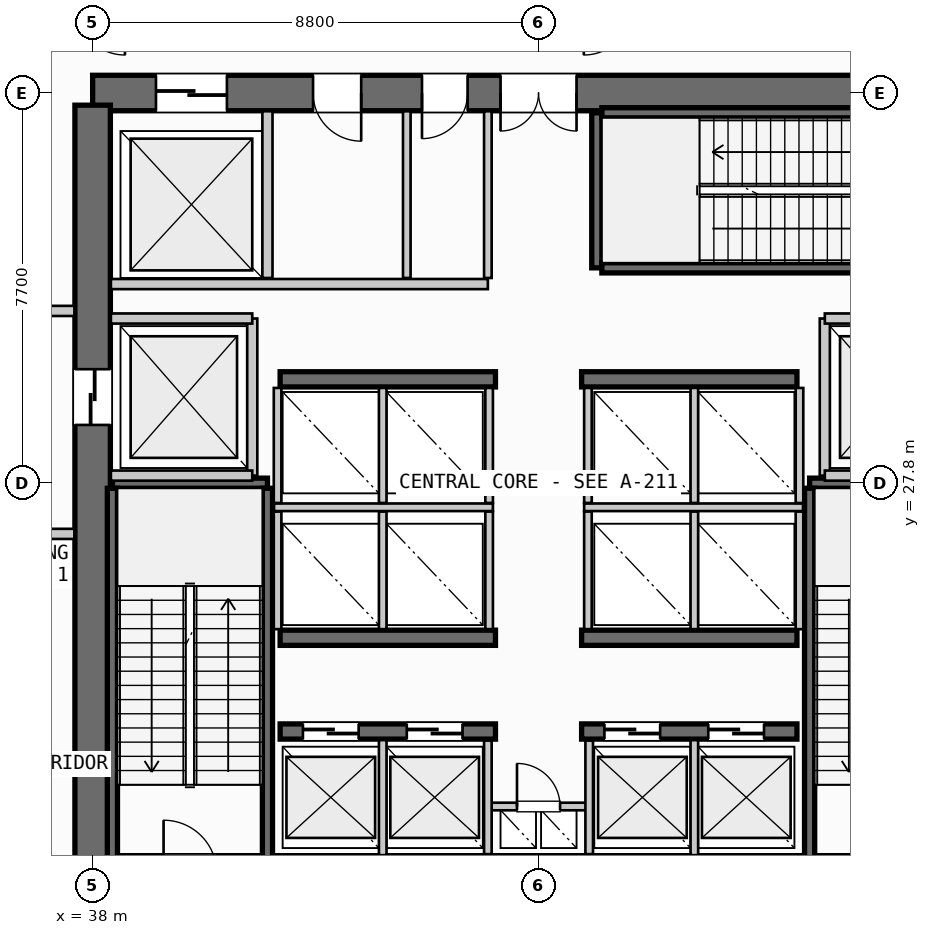
"""IFC4 building model, lengths in metres.
Left out: names, types, materials, properties, quantities, classifications, styles, units other than length and angle.
Written with IfcOpenShell. Run it as: python <this file> out.ifc"""

import sys

from ifc_helpers import new_model, si_unit, direction, frame, frame_2d, origin, place, context, subcontext, project, spatial, rectangle, extrude, source, transform, mapped, element, fill, save


model = new_model("IFC4")
c1 = context("Model", 3, precision=1e-05, world=origin(), true_north=direction((0.0, 1.0)))
c2 = subcontext(c1, "Body", "Model", "MODEL_VIEW")
j1 = project(units=[si_unit("LENGTHUNIT", "METRE"), si_unit("PLANEANGLEUNIT", "RADIAN")], contexts=[c1])
p1 = place(None, origin())
s1 = spatial("IfcSite", under=j1, at=p1, CompositionType="ELEMENT")
p2 = place(p1, origin())
s2 = spatial("IfcBuilding", under=s1, at=p2, CompositionType="ELEMENT")
p3 = place(p2, frame((0.0, 0.0, 80.4)))
s3 = spatial("IfcBuildingStorey", under=s2, at=p3, CompositionType="ELEMENT", Elevation=80.4)
p4 = place(p3, frame((38.0, 20.1, 0.0), z_axis=(0.0, 0.0, 1.0), x_axis=(1.0, 0.0, 0.0)))
e1 = element("IfcWall", 1, at=p4, inside=s3, PredefinedType="SHEAR", context=c2, shape_type="SweptSolid", body=[
    extrude(rectangle(XDim=17.6, YDim=0.7, at=frame_2d((8.8, 0.0))), origin(), (0.0, 0.0, 1.0), 4.76),
])
p5 = place(p4, frame((1.4, 0.0, 0.0)))
e2 = element("IfcOpeningElement", 2, at=p5, cuts=e1, PredefinedType="OPENING", context=c2, shape_type="SweptSolid", body=[
    extrude(rectangle(XDim=1.05, YDim=2.15, at=frame_2d((0.525, 1.075))), frame((0.0, 0.36, 0.0), z_axis=(0.0, -1.0, 0.0), x_axis=(1.0, 0.0, 0.0)), (0.0, 0.0, 1.0), 0.72),
])
p6 = place(p4, frame((15.15, 0.0, 0.0)))
e3 = element("IfcOpeningElement", 3, at=p6, cuts=e1, PredefinedType="OPENING", context=c2, shape_type="SweptSolid", body=[
    extrude(rectangle(XDim=1.05, YDim=2.15, at=frame_2d((0.525, 1.075))), frame((0.0, 0.36, 0.0), z_axis=(0.0, -1.0, 0.0), x_axis=(1.0, 0.0, 0.0)), (0.0, 0.0, 1.0), 0.72),
])
p7 = place(p3, frame((55.6, 35.5, 0.0), z_axis=(0.0, 0.0, 1.0), x_axis=(-1.0, 0.0, 0.0)))
e4 = element("IfcWall", 4, at=p7, inside=s3, PredefinedType="SHEAR", context=c2, shape_type="SweptSolid", body=[
    extrude(rectangle(XDim=17.6, YDim=0.7, at=frame_2d((8.8, 0.0))), origin(), (0.0, 0.0, 1.0), 4.76),
])
p8 = place(p7, frame((8.05, 0.0, 0.0)))
e5 = element("IfcOpeningElement", 5, at=p8, cuts=e4, PredefinedType="OPENING", context=c2, shape_type="SweptSolid", body=[
    extrude(rectangle(XDim=1.5, YDim=2.2, at=frame_2d((0.75, 1.1))), frame((0.0, 0.36, 0.0), z_axis=(0.0, -1.0, 0.0), x_axis=(1.0, 0.0, 0.0)), (0.0, 0.0, 1.0), 0.72),
])
p9 = place(p7, frame((14.95, 0.0, 0.0)))
e6 = element("IfcOpeningElement", 6, at=p9, cuts=e4, PredefinedType="OPENING", context=c2, shape_type="SweptSolid", body=[
    extrude(rectangle(XDim=1.4, YDim=2.3, at=frame_2d((0.7, 1.15))), frame((0.0, 0.36, 0.0), z_axis=(0.0, -1.0, 0.0), x_axis=(1.0, 0.0, 0.0)), (0.0, 0.0, 1.0), 0.72),
])
p10 = place(p7, frame((12.3, 0.0, 0.0)))
e7 = element("IfcOpeningElement", 7, at=p10, cuts=e4, PredefinedType="OPENING", context=c2, shape_type="SweptSolid", body=[
    extrude(rectangle(XDim=0.95, YDim=2.15, at=frame_2d((0.475, 1.075))), frame((0.0, 0.36, 0.0), z_axis=(0.0, -1.0, 0.0), x_axis=(1.0, 0.0, 0.0)), (0.0, 0.0, 1.0), 0.72),
])
p11 = place(p7, frame((10.2, 0.0, 0.0)))
e8 = element("IfcOpeningElement", 8, at=p11, cuts=e4, PredefinedType="OPENING", context=c2, shape_type="SweptSolid", body=[
    extrude(rectangle(XDim=0.9, YDim=2.15, at=frame_2d((0.45, 1.075))), frame((0.0, 0.36, 0.0), z_axis=(0.0, -1.0, 0.0), x_axis=(1.0, 0.0, 0.0)), (0.0, 0.0, 1.0), 0.72),
])
p12 = place(p3, frame((38.0, 35.26, 0.0), z_axis=(0.0, 0.0, 1.0), x_axis=(0.0, -1.0, 0.0)))
e9 = element("IfcWall", 9, at=p12, inside=s3, PredefinedType="SHEAR", context=c2, shape_type="SweptSolid", body=[
    extrude(rectangle(XDim=14.92, YDim=0.7, at=frame_2d((7.46, 0.0))), origin(), (0.0, 0.0, 1.0), 4.76),
])
p13 = place(p12, frame((5.21, 0.0, 0.0)))
e10 = element("IfcOpeningElement", 10, at=p13, cuts=e9, PredefinedType="OPENING", context=c2, shape_type="SweptSolid", body=[
    extrude(rectangle(XDim=1.1, YDim=2.2, at=frame_2d((0.55, 1.1))), frame((0.0, 0.36, 0.0), z_axis=(0.0, -1.0, 0.0), x_axis=(1.0, 0.0, 0.0)), (0.0, 0.0, 1.0), 0.72),
])
p14 = place(p3, frame((41.7, 22.9, 0.0), z_axis=(0.0, 0.0, 1.0), x_axis=(1.0, 0.0, 0.0)))
e11 = element("IfcWall", 11, at=p14, inside=s3, PredefinedType="SHEAR", context=c2, shape_type="SweptSolid", body=[
    extrude(rectangle(XDim=4.25, YDim=0.3, at=frame_2d((2.125, 0.0))), origin(), (0.0, 0.0, 1.0), 4.76),
])
p15 = place(p14, frame((0.45, 0.0, 0.0)))
e12 = element("IfcOpeningElement", 12, at=p15, cuts=e11, PredefinedType="OPENING", context=c2, shape_type="SweptSolid", body=[
    extrude(rectangle(XDim=1.1, YDim=2.2, at=frame_2d((0.55, 1.1))), frame((0.0, 0.16, 0.0), z_axis=(0.0, -1.0, 0.0), x_axis=(1.0, 0.0, 0.0)), (0.0, 0.0, 1.0), 0.32),
])
p16 = place(p14, frame((2.5, 0.0, 0.0)))
e13 = element("IfcOpeningElement", 13, at=p16, cuts=e11, PredefinedType="OPENING", context=c2, shape_type="SweptSolid", body=[
    extrude(rectangle(XDim=1.1, YDim=2.2, at=frame_2d((0.55, 1.1))), frame((0.0, 0.16, 0.0), z_axis=(0.0, -1.0, 0.0), x_axis=(1.0, 0.0, 0.0)), (0.0, 0.0, 1.0), 0.32),
])
p17 = place(p3, frame((47.65, 22.9, 0.0), z_axis=(0.0, 0.0, 1.0), x_axis=(1.0, 0.0, 0.0)))
e14 = element("IfcWall", 14, at=p17, inside=s3, PredefinedType="SHEAR", context=c2, shape_type="SweptSolid", body=[
    extrude(rectangle(XDim=4.25, YDim=0.3, at=frame_2d((2.125, 0.0))), origin(), (0.0, 0.0, 1.0), 4.76),
])
p18 = place(p17, frame((0.45, 0.0, 0.0)))
e15 = element("IfcOpeningElement", 15, at=p18, cuts=e14, PredefinedType="OPENING", context=c2, shape_type="SweptSolid", body=[
    extrude(rectangle(XDim=1.1, YDim=2.2, at=frame_2d((0.55, 1.1))), frame((0.0, 0.16, 0.0), z_axis=(0.0, -1.0, 0.0), x_axis=(1.0, 0.0, 0.0)), (0.0, 0.0, 1.0), 0.32),
])
p19 = place(p17, frame((2.5, 0.0, 0.0)))
e16 = element("IfcOpeningElement", 16, at=p19, cuts=e14, PredefinedType="OPENING", context=c2, shape_type="SweptSolid", body=[
    extrude(rectangle(XDim=1.1, YDim=2.2, at=frame_2d((0.55, 1.1))), frame((0.0, 0.16, 0.0), z_axis=(0.0, -1.0, 0.0), x_axis=(1.0, 0.0, 0.0)), (0.0, 0.0, 1.0), 0.32),
])
for number, where, z_axis, x_axis in (
    (17, (41.7, 24.75, 0.0), (0.0, 0.0, 1.0), (1.0, 0.0, 0.0)),
    (18, (47.65, 24.75, 0.0), (0.0, 0.0, 1.0), (1.0, 0.0, 0.0)),
    (19, (41.7, 29.85, 0.0), (0.0, 0.0, 1.0), (1.0, 0.0, 0.0)),
    (20, (47.65, 29.85, 0.0), (0.0, 0.0, 1.0), (1.0, 0.0, 0.0)),
):
    element("IfcWall", number, at=place(p3, frame(where, z_axis=z_axis, x_axis=x_axis)), inside=s3, PredefinedType="SHEAR", context=c2, shape_type="SweptSolid", body=[
        extrude(rectangle(XDim=4.25, YDim=0.3, at=frame_2d((2.125, 0.0))), origin(), (0.0, 0.0, 1.0), 4.76),
    ])
p20 = place(p3, frame((38.39, 27.8, 0.0), z_axis=(0.0, 0.0, 1.0), x_axis=(1.0, 0.0, 0.0)))
e21 = element("IfcWall", 21, at=p20, inside=s3, PredefinedType="SHEAR", context=c2, shape_type="SweptSolid", body=[
    extrude(rectangle(XDim=3.06, YDim=0.2, at=frame_2d((1.53, 0.0))), origin(), (0.0, 0.0, 1.0), 4.76),
])
for number, where, z_axis, x_axis in (
    (22, (41.45, 27.7, 0.0), (0.0, 0.0, 1.0), (0.0, -1.0, 0.0)),
    (23, (38.39, 20.35, 0.0), (0.0, 0.0, 1.0), (0.0, 1.0, 0.0)),
):
    element("IfcWall", number, at=place(p3, frame(where, z_axis=z_axis, x_axis=x_axis)), inside=s3, PredefinedType="SHEAR", context=c2, shape_type="SweptSolid", body=[
        extrude(rectangle(XDim=7.35, YDim=0.2, at=frame_2d((3.675, 0.0))), origin(), (0.0, 0.0, 1.0), 4.76),
    ])
p21 = place(p3, frame((52.15, 27.8, 0.0), z_axis=(0.0, 0.0, 1.0), x_axis=(1.0, 0.0, 0.0)))
e24 = element("IfcWall", 24, at=p21, inside=s3, PredefinedType="SHEAR", context=c2, shape_type="SweptSolid", body=[
    extrude(rectangle(XDim=3.06, YDim=0.2, at=frame_2d((1.53, 0.0))), origin(), (0.0, 0.0, 1.0), 4.76),
])
p22 = place(p3, frame((52.15, 20.35, 0.0), z_axis=(0.0, 0.0, 1.0), x_axis=(0.0, 1.0, 0.0)))
e25 = element("IfcWall", 25, at=p22, inside=s3, PredefinedType="SHEAR", context=c2, shape_type="SweptSolid", body=[
    extrude(rectangle(XDim=7.35, YDim=0.2, at=frame_2d((3.675, 0.0))), origin(), (0.0, 0.0, 1.0), 4.76),
])
p23 = place(p3, frame((47.95, 32.05, 0.0), z_axis=(0.0, 0.0, 1.0), x_axis=(0.0, 1.0, 0.0)))
e26 = element("IfcWall", 26, at=p23, inside=s3, PredefinedType="SHEAR", context=c2, shape_type="SweptSolid", body=[
    extrude(rectangle(XDim=3.06, YDim=0.2, at=frame_2d((1.53, 0.0))), origin(), (0.0, 0.0, 1.0), 4.76),
])
for number, where, z_axis, x_axis in (
    (27, (48.05, 35.11, 0.0), (0.0, 0.0, 1.0), (1.0, 0.0, 0.0)),
    (28, (55.4, 32.05, 0.0), (0.0, 0.0, 1.0), (-1.0, 0.0, 0.0)),
):
    element("IfcWall", number, at=place(p3, frame(where, z_axis=z_axis, x_axis=x_axis)), inside=s3, PredefinedType="SHEAR", context=c2, shape_type="SweptSolid", body=[
        extrude(rectangle(XDim=7.35, YDim=0.2, at=frame_2d((3.675, 0.0))), origin(), (0.0, 0.0, 1.0), 4.76),
    ])
p24 = place(p3, frame((45.8, 21.42, 0.0), z_axis=(0.0, 0.0, 1.0), x_axis=(1.0, 0.0, 0.0)))
e29 = element("IfcWall", 29, at=p24, inside=s3, PredefinedType="PARTITIONING", context=c2, shape_type="SweptSolid", body=[
    extrude(rectangle(XDim=2.0, YDim=0.15, at=frame_2d((1.0, 0.0))), origin(), (0.0, 0.0, 1.0), 2.335),
])
p25 = place(p24, frame((0.575, 0.0, 0.0)))
e30 = element("IfcOpeningElement", 30, at=p25, cuts=e29, PredefinedType="OPENING", context=c2, shape_type="SweptSolid", body=[
    extrude(rectangle(XDim=0.85, YDim=2.15, at=frame_2d((0.425, 1.075))), frame((0.0, 0.085, 0.0), z_axis=(0.0, -1.0, 0.0), x_axis=(1.0, 0.0, 0.0)), (0.0, 0.0, 1.0), 0.17),
])
for number, where, z_axis, x_axis in (
    (31, (45.8, 20.48, 0.0), (0.0, 0.0, 1.0), (0.0, 1.0, 0.0)),
    (32, (47.8, 20.48, 0.0), (0.0, 0.0, 1.0), (0.0, 1.0, 0.0)),
):
    element("IfcWall", number, at=place(p3, frame(where, z_axis=z_axis, x_axis=x_axis)), inside=s3, PredefinedType="PARTITIONING", context=c2, shape_type="SweptSolid", body=[
        extrude(rectangle(XDim=2.24, YDim=0.15, at=frame_2d((1.12, 0.0))), origin(), (0.0, 0.0, 1.0), 2.335),
    ])
p26 = place(p3, frame((41.15, 27.95, 0.0), z_axis=(0.0, 0.0, 1.0), x_axis=(0.0, 1.0, 0.0)))
e33 = element("IfcWall", 33, at=p26, inside=s3, PredefinedType="PARTITIONING", context=c2, shape_type="SweptSolid", body=[
    extrude(rectangle(XDim=3.1, YDim=0.2, at=frame_2d((1.55, 0.0))), origin(), (0.0, 0.0, 1.0), 2.335),
])
for number, where, z_axis, x_axis in (
    (34, (38.36, 27.95, 0.0), (0.0, 0.0, 1.0), (1.0, 0.0, 0.0)),
    (35, (38.36, 31.05, 0.0), (0.0, 0.0, 1.0), (1.0, 0.0, 0.0)),
):
    element("IfcWall", number, at=place(p3, frame(where, z_axis=z_axis, x_axis=x_axis)), inside=s3, PredefinedType="PARTITIONING", context=c2, shape_type="SweptSolid", body=[
        extrude(rectangle(XDim=2.79, YDim=0.2, at=frame_2d((1.395, 0.0))), origin(), (0.0, 0.0, 1.0), 2.335),
    ])
for number, where, z_axis, x_axis in (
    (36, (34.5, 26.8, 0.0), (0.0, 0.0, 1.0), (1.0, 0.0, 0.0)),
    (37, (34.5, 31.2, 0.0), (0.0, 0.0, 1.0), (1.0, 0.0, 0.0)),
):
    element("IfcWall", number, at=place(p3, frame(where, z_axis=z_axis, x_axis=x_axis)), inside=s3, PredefinedType="PARTITIONING", context=c2, shape_type="SweptSolid", body=[
        extrude(rectangle(XDim=3.14, YDim=0.2, at=frame_2d((1.57, 0.0))), origin(), (0.0, 0.0, 1.0), 2.335),
    ])
p27 = place(p3, frame((52.45, 27.95, 0.0), z_axis=(0.0, 0.0, 1.0), x_axis=(0.0, 1.0, 0.0)))
e38 = element("IfcWall", 38, at=p27, inside=s3, PredefinedType="PARTITIONING", context=c2, shape_type="SweptSolid", body=[
    extrude(rectangle(XDim=3.1, YDim=0.2, at=frame_2d((1.55, 0.0))), origin(), (0.0, 0.0, 1.0), 2.335),
])
for number, where, z_axis, x_axis in (
    (39, (52.45, 27.95, 0.0), (0.0, 0.0, 1.0), (1.0, 0.0, 0.0)),
    (40, (52.45, 31.05, 0.0), (0.0, 0.0, 1.0), (1.0, 0.0, 0.0)),
):
    element("IfcWall", number, at=place(p3, frame(where, z_axis=z_axis, x_axis=x_axis)), inside=s3, PredefinedType="PARTITIONING", context=c2, shape_type="SweptSolid", body=[
        extrude(rectangle(XDim=2.79, YDim=0.2, at=frame_2d((1.395, 0.0))), origin(), (0.0, 0.0, 1.0), 2.335),
    ])
for number, where, z_axis, x_axis in (
    (41, (43.725, 20.46, 0.0), (0.0, 0.0, 1.0), (0.0, 1.0, 0.0)),
    (42, (49.875, 20.46, 0.0), (0.0, 0.0, 1.0), (0.0, 1.0, 0.0)),
):
    element("IfcWall", number, at=place(p3, frame(where, z_axis=z_axis, x_axis=x_axis)), inside=s3, PredefinedType="PARTITIONING", context=c2, shape_type="SweptSolid", body=[
        extrude(rectangle(XDim=2.27, YDim=0.15, at=frame_2d((1.135, 0.0))), origin(), (0.0, 0.0, 1.0), 2.335),
    ])
p28 = place(p3, frame((41.58, 27.325, 0.0), z_axis=(0.0, 0.0, 1.0), x_axis=(1.0, 0.0, 0.0)))
e43 = element("IfcWall", 43, at=p28, inside=s3, PredefinedType="PARTITIONING", context=c2, shape_type="SweptSolid", body=[
    extrude(rectangle(XDim=4.32, YDim=0.15, at=frame_2d((2.16, 0.0))), origin(), (0.0, 0.0, 1.0), 2.335),
])
p29 = place(p3, frame((47.7, 27.325, 0.0), z_axis=(0.0, 0.0, 1.0), x_axis=(1.0, 0.0, 0.0)))
e44 = element("IfcWall", 44, at=p29, inside=s3, PredefinedType="PARTITIONING", context=c2, shape_type="SweptSolid", body=[
    extrude(rectangle(XDim=4.32, YDim=0.15, at=frame_2d((2.16, 0.0))), origin(), (0.0, 0.0, 1.0), 2.335),
])
for number, where, z_axis, x_axis in (
    (45, (41.65, 24.92, 0.0), (0.0, 0.0, 1.0), (0.0, 1.0, 0.0)),
    (46, (43.725, 24.92, 0.0), (0.0, 0.0, 1.0), (0.0, 1.0, 0.0)),
    (47, (45.825, 24.92, 0.0), (0.0, 0.0, 1.0), (0.0, 1.0, 0.0)),
    (48, (47.775, 24.92, 0.0), (0.0, 0.0, 1.0), (0.0, 1.0, 0.0)),
    (49, (49.875, 24.92, 0.0), (0.0, 0.0, 1.0), (0.0, 1.0, 0.0)),
    (50, (51.95, 24.92, 0.0), (0.0, 0.0, 1.0), (0.0, 1.0, 0.0)),
):
    element("IfcWall", number, at=place(p3, frame(where, z_axis=z_axis, x_axis=x_axis)), inside=s3, PredefinedType="PARTITIONING", context=c2, shape_type="SweptSolid", body=[
        extrude(rectangle(XDim=2.32, YDim=0.15, at=frame_2d((1.16, 0.0))), origin(), (0.0, 0.0, 1.0), 2.335),
    ])
for number, where, z_axis, x_axis in (
    (51, (41.65, 27.41, 0.0), (0.0, 0.0, 1.0), (0.0, 1.0, 0.0)),
    (52, (43.725, 27.41, 0.0), (0.0, 0.0, 1.0), (0.0, 1.0, 0.0)),
    (53, (45.825, 27.41, 0.0), (0.0, 0.0, 1.0), (0.0, 1.0, 0.0)),
    (54, (47.775, 27.41, 0.0), (0.0, 0.0, 1.0), (0.0, 1.0, 0.0)),
    (55, (49.875, 27.41, 0.0), (0.0, 0.0, 1.0), (0.0, 1.0, 0.0)),
    (56, (51.95, 27.41, 0.0), (0.0, 0.0, 1.0), (0.0, 1.0, 0.0)),
):
    element("IfcWall", number, at=place(p3, frame(where, z_axis=z_axis, x_axis=x_axis)), inside=s3, PredefinedType="PARTITIONING", context=c2, shape_type="SweptSolid", body=[
        extrude(rectangle(XDim=2.27, YDim=0.15, at=frame_2d((1.135, 0.0))), origin(), (0.0, 0.0, 1.0), 2.335),
    ])
p30 = place(p3, frame((41.45, 31.85, 0.0), z_axis=(0.0, 0.0, 1.0), x_axis=(0.0, 1.0, 0.0)))
e57 = element("IfcWall", 57, at=p30, inside=s3, PredefinedType="PARTITIONING", context=c2, shape_type="SweptSolid", body=[
    extrude(rectangle(XDim=3.29, YDim=0.2, at=frame_2d((1.645, 0.0))), origin(), (0.0, 0.0, 1.0), 2.335),
])
p31 = place(p3, frame((38.36, 31.73, 0.0), z_axis=(0.0, 0.0, 1.0), x_axis=(1.0, 0.0, 0.0)))
e58 = element("IfcWall", 58, at=p31, inside=s3, PredefinedType="PARTITIONING", context=c2, shape_type="SweptSolid", body=[
    extrude(rectangle(XDim=7.44, YDim=0.2, at=frame_2d((3.72, 0.0))), origin(), (0.0, 0.0, 1.0), 2.335),
])
p32 = place(p3, frame((45.8, 31.85, 0.0), z_axis=(0.0, 0.0, 1.0), x_axis=(0.0, 1.0, 0.0)))
e59 = element("IfcWall", 59, at=p32, inside=s3, PredefinedType="PARTITIONING", context=c2, shape_type="SweptSolid", body=[
    extrude(rectangle(XDim=3.29, YDim=0.15, at=frame_2d((1.645, 0.0))), origin(), (0.0, 0.0, 1.0), 2.335),
])
p33 = place(p3, frame((44.2, 31.85, 0.0), z_axis=(0.0, 0.0, 1.0), x_axis=(0.0, 1.0, 0.0)))
e60 = element("IfcWall", 60, at=p33, inside=s3, PredefinedType="PLUMBINGWALL", context=c2, shape_type="SweptSolid", body=[
    extrude(rectangle(XDim=3.29, YDim=0.15, at=frame_2d((1.645, 0.0))), origin(), (0.0, 0.0, 1.0), 2.335),
])
m1 = source(origin(), c2, "Body", "SweptSolid", [
    extrude(rectangle(XDim=1.5, YDim=2.2, at=frame_2d((0.75, 1.1))), frame((0.0, 0.025, 0.0), z_axis=(0.0, -1.0, 0.0), x_axis=(1.0, 0.0, 0.0)), (0.0, 0.0, 1.0), 0.05),
])
p34 = place(p8, origin())
e61 = element("IfcDoor", 61, at=p34, inside=s3, OperationType="DOUBLE_DOOR_SINGLE_SWING", PredefinedType="DOOR", context=c2, shape_type="MappedRepresentation", body=[
    mapped(m1, transform((0.0, 0.0, 0.0), scale=1.0)),
])
fill(e5, e61)
m2 = source(origin(), c2, "Body", "SweptSolid", [
    extrude(rectangle(XDim=1.1, YDim=2.2, at=frame_2d((0.55, 1.1))), frame((0.0, 0.025, 0.0), z_axis=(0.0, -1.0, 0.0), x_axis=(1.0, 0.0, 0.0)), (0.0, 0.0, 1.0), 0.05),
])
p35 = place(p13, origin())
e62 = element("IfcDoor", 62, at=p35, inside=s3, OperationType="SLIDING_TO_LEFT", PredefinedType="DOOR", context=c2, shape_type="MappedRepresentation", body=[
    mapped(m2, transform((0.0, 0.0, 0.0), scale=1.0)),
])
fill(e10, e62)
p36 = place(p15, origin())
e63 = element("IfcDoor", 63, at=p36, inside=s3, OperationType="SLIDING_TO_LEFT", PredefinedType="DOOR", context=c2, shape_type="MappedRepresentation", body=[
    mapped(m2, transform((0.0, 0.0, 0.0), scale=1.0)),
])
fill(e12, e63)
p37 = place(p16, origin())
e64 = element("IfcDoor", 64, at=p37, inside=s3, OperationType="SLIDING_TO_LEFT", PredefinedType="DOOR", context=c2, shape_type="MappedRepresentation", body=[
    mapped(m2, transform((0.0, 0.0, 0.0), scale=1.0)),
])
fill(e13, e64)
p38 = place(p18, origin())
e65 = element("IfcDoor", 65, at=p38, inside=s3, OperationType="SLIDING_TO_LEFT", PredefinedType="DOOR", context=c2, shape_type="MappedRepresentation", body=[
    mapped(m2, transform((0.0, 0.0, 0.0), scale=1.0)),
])
fill(e15, e65)
p39 = place(p19, origin())
e66 = element("IfcDoor", 66, at=p39, inside=s3, OperationType="SLIDING_TO_LEFT", PredefinedType="DOOR", context=c2, shape_type="MappedRepresentation", body=[
    mapped(m2, transform((0.0, 0.0, 0.0), scale=1.0)),
])
fill(e16, e66)
m3 = source(origin(), c2, "Body", "SweptSolid", [
    extrude(rectangle(XDim=1.4, YDim=2.3, at=frame_2d((0.7, 1.15))), frame((0.0, 0.025, 0.0), z_axis=(0.0, -1.0, 0.0), x_axis=(1.0, 0.0, 0.0)), (0.0, 0.0, 1.0), 0.05),
])
p40 = place(p9, origin())
e67 = element("IfcDoor", 67, at=p40, inside=s3, OperationType="SLIDING_TO_RIGHT", PredefinedType="DOOR", context=c2, shape_type="MappedRepresentation", body=[
    mapped(m3, transform((0.0, 0.0, 0.0), scale=1.0)),
])
fill(e6, e67)
m4 = source(origin(), c2, "Body", "SweptSolid", [
    extrude(rectangle(XDim=0.95, YDim=2.15, at=frame_2d((0.475, 1.075))), frame((0.0, 0.025, 0.0), z_axis=(0.0, -1.0, 0.0), x_axis=(1.0, 0.0, 0.0)), (0.0, 0.0, 1.0), 0.05),
])
p41 = place(p10, origin())
e68 = element("IfcDoor", 68, at=p41, inside=s3, OperationType="SINGLE_SWING_LEFT", PredefinedType="DOOR", context=c2, shape_type="MappedRepresentation", body=[
    mapped(m4, transform((0.0, 0.0, 0.0), scale=1.0)),
])
fill(e7, e68)
m5 = source(origin(), c2, "Body", "SweptSolid", [
    extrude(rectangle(XDim=0.9, YDim=2.15, at=frame_2d((0.45, 1.075))), frame((0.0, 0.025, 0.0), z_axis=(0.0, -1.0, 0.0), x_axis=(1.0, 0.0, 0.0)), (0.0, 0.0, 1.0), 0.05),
])
p42 = place(p11, origin())
e69 = element("IfcDoor", 69, at=p42, inside=s3, OperationType="SINGLE_SWING_RIGHT", PredefinedType="DOOR", context=c2, shape_type="MappedRepresentation", body=[
    mapped(m5, transform((0.0, 0.0, 0.0), scale=1.0)),
])
fill(e8, e69)
m6 = source(origin(), c2, "Body", "SweptSolid", [
    extrude(rectangle(XDim=0.85, YDim=2.15, at=frame_2d((0.425, 1.075))), frame((0.0, 0.025, 0.0), z_axis=(0.0, -1.0, 0.0), x_axis=(1.0, 0.0, 0.0)), (0.0, 0.0, 1.0), 0.05),
])
p43 = place(p25, origin())
e70 = element("IfcDoor", 70, at=p43, inside=s3, OperationType="SINGLE_SWING_LEFT", PredefinedType="DOOR", context=c2, shape_type="MappedRepresentation", body=[
    mapped(m6, transform((0.0, 0.0, 0.0), scale=1.0)),
])
fill(e30, e70)
save(model, sys.argv[1])
